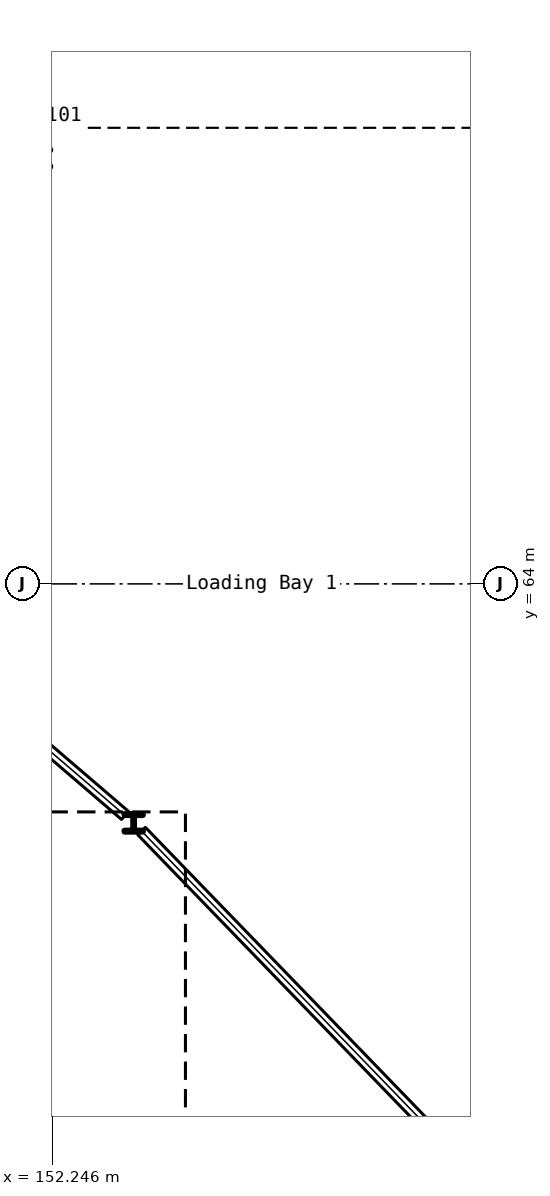
"""IFC4 building model, lengths in metres.
Left out: names, types, materials, properties, quantities, classifications, styles, units other than length and angle.
Written with IfcOpenShell. Run it as: python <this file> out.ifc"""

import sys

from ifc_helpers import new_model, si_unit, direction, frame, frame_2d, origin, origin_2d, place, context, subcontext, project, spatial, rectangle, i_section, extrude, element, save


model = new_model("IFC4")
c1 = context("Model", 3, precision=1e-05, world=origin(), true_north=direction((0.0, 1.0)))
c2 = subcontext(c1, "Body", "Model", "MODEL_VIEW")
j1 = project(units=[si_unit("LENGTHUNIT", "METRE"), si_unit("PLANEANGLEUNIT", "RADIAN")], contexts=[c1])
p1 = place(None, origin())
s1 = spatial("IfcSite", under=j1, at=p1, CompositionType="ELEMENT")
p2 = place(p1, origin())
s2 = spatial("IfcBuilding", under=s1, at=p2, CompositionType="ELEMENT")
p3 = place(p2, origin())
s3 = spatial("IfcBuildingStorey", under=s2, at=p3, CompositionType="ELEMENT", Elevation=0.0)
p4 = place(p3, frame((150.0, 70.15, -0.05), z_axis=(0.0, 0.0, 1.0), x_axis=(1.0, 0.0, 0.0)))
e1 = element("IfcWall", 1, at=p4, inside=s3, PredefinedType="SHEAR", context=c2, shape_type="SweptSolid", body=[
    extrude(rectangle(XDim=32.0, YDim=0.3, at=frame_2d((16.0, 0.0))), origin(), (0.0, 0.0, 1.0), 0.9),
])
p5 = place(p3, frame((153.319, 60.856, 0.0), z_axis=(0.0, 0.0, 1.0), x_axis=(1.0, 0.0, 0.0)))
e2 = element("IfcColumn", 2, at=p5, inside=s3, PredefinedType="COLUMN", context=c2, shape_type="SweptSolid", body=[
    extrude(i_section(OverallWidth=0.24, OverallDepth=0.23, WebThickness=0.008, FlangeThickness=0.012, FilletRadius=0.021, at=origin_2d()), origin(), (0.0, 0.0, 1.0), 8.15),
])
save(model, sys.argv[1])
